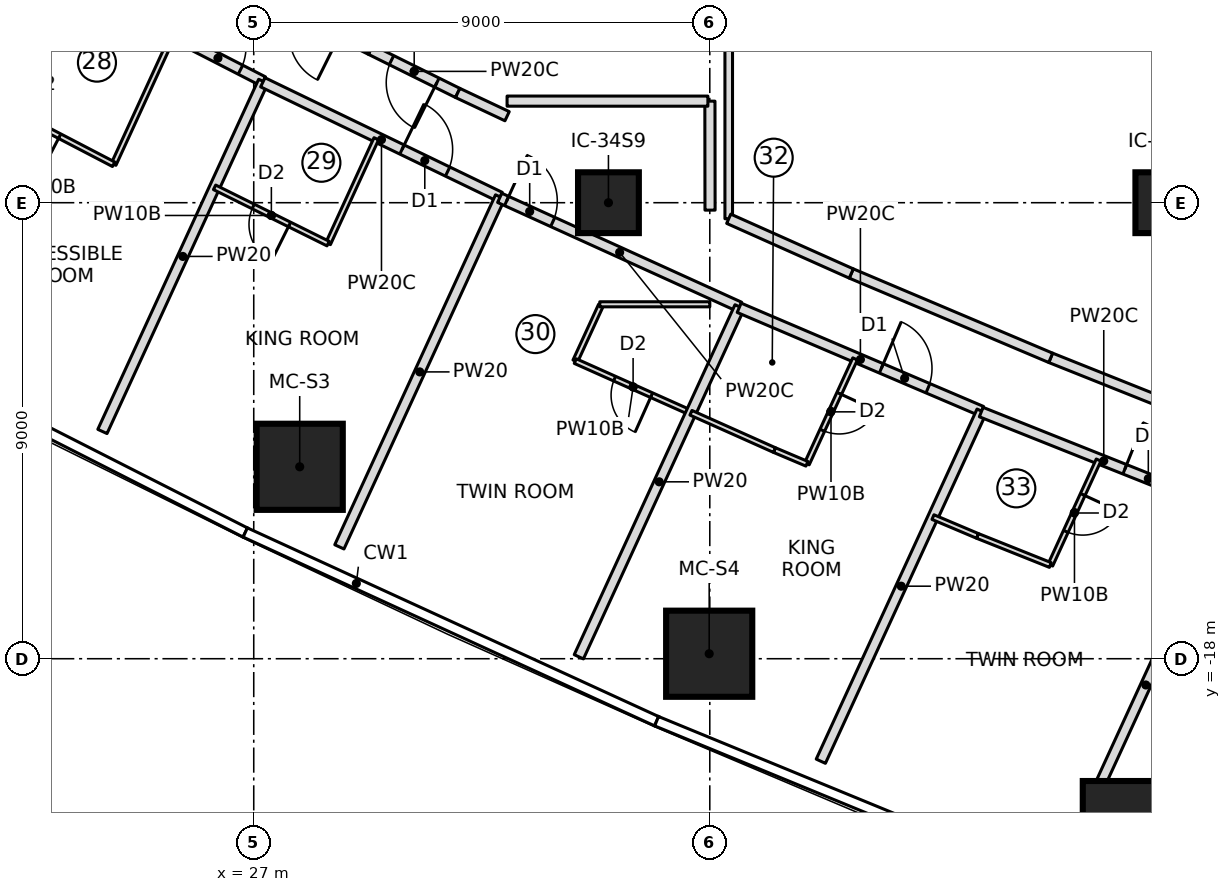
"""IFC4 building model, lengths in metres.
Left out: names, types, materials, properties, quantities, classifications, styles, units other than length and angle.
Written with IfcOpenShell. Run it as: python <this file> out.ifc"""

import sys

from ifc_helpers import new_model, si_unit, direction, frame, frame_2d, origin, origin_2d, place, context, subcontext, project, spatial, rectangle, extrude, element, fill, save


model = new_model("IFC4")
c1 = context("Model", 3, precision=1e-05, world=origin(), true_north=direction((0.0, 1.0)))
c2 = subcontext(c1, "Body", "Model", "MODEL_VIEW")
j1 = project(units=[si_unit("LENGTHUNIT", "METRE"), si_unit("PLANEANGLEUNIT", "RADIAN")], contexts=[c1])
p1 = place(None, origin())
s1 = spatial("IfcSite", under=j1, at=p1, CompositionType="ELEMENT")
p2 = place(p1, origin())
s2 = spatial("IfcBuilding", under=s1, at=p2, CompositionType="ELEMENT")
p3 = place(p2, frame((0.0, 0.0, 116.85)))
s3 = spatial("IfcBuildingStorey", under=s2, at=p3, CompositionType="ELEMENT", Elevation=116.85)
for number, where, z_axis, x_axis in (
    (1, (27.907, -14.212, 0.0), (0.0, 0.0, 1.0), (1.0, 0.0, 0.0)),
    (2, (35.988, -17.902, 0.0), (0.0, 0.0, 1.0), (1.0, 0.0, 0.0)),
    (3, (44.211, -21.264, 0.0), (0.0, 0.0, 1.0), (1.0, 0.0, 0.0)),
):
    element("IfcColumn", number, at=place(p3, frame(where, z_axis=z_axis, x_axis=x_axis)), inside=s3, PredefinedType="COLUMN", context=c2, shape_type="SweptSolid", body=[
        extrude(rectangle(XDim=1.7, YDim=1.7, at=origin_2d()), origin(), (0.0, 0.0, 1.0), 3.55),
    ])
for number, where, z_axis, x_axis in (
    (4, (34.0, -9.0, 0.0), (0.0, 0.0, 1.0), (1.0, 0.0, 0.0)),
    (5, (45.0, -9.0, 0.0), (0.0, 0.0, 1.0), (1.0, 0.0, 0.0)),
):
    element("IfcColumn", number, at=place(p3, frame(where, z_axis=z_axis, x_axis=x_axis)), inside=s3, PredefinedType="COLUMN", context=c2, shape_type="SweptSolid", body=[
        extrude(rectangle(XDim=1.2, YDim=1.2, at=origin_2d()), origin(), (0.0, 0.0, 1.0), 3.55),
    ])
p4 = place(p3, frame((22.557, -4.229, 0.0), z_axis=(0.0, 0.0, 1.0), x_axis=(0.889706581948, -0.456532800617, 0.0)))
e6 = element("IfcWall", 6, at=p4, inside=s3, PredefinedType="PARTITIONING", context=c2, shape_type="SweptSolid", body=[
    extrude(rectangle(XDim=5.205, YDim=0.2, at=frame_2d((2.603, 0.0))), origin(), (0.0, 0.0, 1.0), 3.15),
])
p5 = place(p4, frame((3.7, 0.0, 0.0)))
e7 = element("IfcOpeningElement", 7, at=p5, cuts=e6, PredefinedType="OPENING", context=c2, shape_type="SweptSolid", body=[
    extrude(rectangle(XDim=1.0, YDim=2.1, at=frame_2d((0.5, 1.05))), frame((0.0, 0.11, 0.0), z_axis=(0.0, -1.0, 0.0), x_axis=(1.0, 0.0, 0.0)), (0.0, 0.0, 1.0), 0.22),
])
p6 = place(p3, frame((25.396, -5.715, 0.0), z_axis=(0.0, 0.0, 1.0), x_axis=(-0.417359077977, -0.908741657475, 0.0)))
e8 = element("IfcWall", 8, at=p6, inside=s3, PredefinedType="PARTITIONING", context=c2, shape_type="SweptSolid", body=[
    extrude(rectangle(XDim=2.78, YDim=0.1, at=frame_2d((1.39, 0.0))), origin(), (0.0, 0.0, 1.0), 3.15),
])
p7 = place(p3, frame((24.235, -8.242, 0.0), z_axis=(0.0, 0.0, 1.0), x_axis=(-0.886897171809, 0.461966889114, 0.0)))
e9 = element("IfcWall", 9, at=p7, inside=s3, PredefinedType="PARTITIONING", context=c2, shape_type="SweptSolid", body=[
    extrude(rectangle(XDim=3.204, YDim=0.1, at=frame_2d((1.602, 0.0))), origin(), (0.0, 0.0, 1.0), 3.15),
])
p8 = place(p7, frame((1.2, 0.0, 0.0)))
e10 = element("IfcOpeningElement", 10, at=p8, cuts=e9, PredefinedType="OPENING", context=c2, shape_type="SweptSolid", body=[
    extrude(rectangle(XDim=0.8, YDim=2.1, at=frame_2d((0.4, 1.05))), frame((0.0, 0.06, 0.0), z_axis=(0.0, -1.0, 0.0), x_axis=(1.0, 0.0, 0.0)), (0.0, 0.0, 1.0), 0.12),
])
p9 = place(p3, frame((24.014, -13.515, 0.0), z_axis=(0.0, 0.0, 1.0), x_axis=(0.417428513692, 0.908709764422, 0.0)))
e11 = element("IfcWall", 11, at=p9, inside=s3, PredefinedType="PARTITIONING", context=c2, shape_type="SweptSolid", body=[
    extrude(rectangle(XDim=7.603, YDim=0.2, at=frame_2d((3.802, 0.0))), origin(), (0.0, 0.0, 1.0), 3.15),
])
p10 = place(p3, frame((27.179, -6.624, 0.0), z_axis=(0.0, 0.0, 1.0), x_axis=(0.900446408639, -0.434966970204, 0.0)))
e12 = element("IfcWall", 12, at=p10, inside=s3, PredefinedType="PARTITIONING", context=c2, shape_type="SweptSolid", body=[
    extrude(rectangle(XDim=5.201, YDim=0.2, at=frame_2d((2.601, 0.0))), origin(), (0.0, 0.0, 1.0), 3.15),
])
p11 = place(p10, frame((3.05, 0.0, 0.0)))
e13 = element("IfcOpeningElement", 13, at=p11, cuts=e12, PredefinedType="OPENING", context=c2, shape_type="SweptSolid", body=[
    extrude(rectangle(XDim=1.0, YDim=2.1, at=frame_2d((0.5, 1.05))), frame((0.0, 0.11, 0.0), z_axis=(0.0, -1.0, 0.0), x_axis=(1.0, 0.0, 0.0)), (0.0, 0.0, 1.0), 0.22),
])
p12 = place(p3, frame((29.419, -7.737, 0.0), z_axis=(0.0, 0.0, 1.0), x_axis=(-0.417344701557, -0.908748260016, 0.0)))
e14 = element("IfcWall", 14, at=p12, inside=s3, PredefinedType="PARTITIONING", context=c2, shape_type="SweptSolid", body=[
    extrude(rectangle(XDim=2.278, YDim=0.1, at=frame_2d((1.139, 0.0))), origin(), (0.0, 0.0, 1.0), 3.15),
])
p13 = place(p3, frame((28.468, -9.807, 0.0), z_axis=(0.0, 0.0, 1.0), x_axis=(-0.895944857815, 0.444165297784, 0.0)))
e15 = element("IfcWall", 15, at=p13, inside=s3, PredefinedType="PARTITIONING", context=c2, shape_type="SweptSolid", body=[
    extrude(rectangle(XDim=2.501, YDim=0.1, at=frame_2d((1.25, 0.0))), origin(), (0.0, 0.0, 1.0), 3.15),
])
p14 = place(p13, frame((0.85, 0.0, 0.0)))
e16 = element("IfcOpeningElement", 16, at=p14, cuts=e15, PredefinedType="OPENING", context=c2, shape_type="SweptSolid", body=[
    extrude(rectangle(XDim=0.8, YDim=2.1, at=frame_2d((0.4, 1.05))), frame((0.0, 0.06, 0.0), z_axis=(0.0, -1.0, 0.0), x_axis=(1.0, 0.0, 0.0)), (0.0, 0.0, 1.0), 0.12),
])
p15 = place(p3, frame((28.69, -15.792, 0.0), z_axis=(0.0, 0.0, 1.0), x_axis=(0.417429919618, 0.90870911859, 0.0)))
e17 = element("IfcWall", 17, at=p15, inside=s3, PredefinedType="PARTITIONING", context=c2, shape_type="SweptSolid", body=[
    extrude(rectangle(XDim=7.6, YDim=0.2, at=frame_2d((3.8, 0.0))), origin(), (0.0, 0.0, 1.0), 3.15),
])
p16 = place(p3, frame((31.854, -8.904, 0.0), z_axis=(0.0, 0.0, 1.0), x_axis=(0.910421138148, -0.413682669704, 0.0)))
e18 = element("IfcWall", 18, at=p16, inside=s3, PredefinedType="PARTITIONING", context=c2, shape_type="SweptSolid", body=[
    extrude(rectangle(XDim=5.2, YDim=0.2, at=frame_2d((2.6, 0.0))), origin(), (0.0, 0.0, 1.0), 3.15),
])
p17 = place(p16, frame((0.15, 0.0, 0.0)))
e19 = element("IfcOpeningElement", 19, at=p17, cuts=e18, PredefinedType="OPENING", context=c2, shape_type="SweptSolid", body=[
    extrude(rectangle(XDim=1.0, YDim=2.1, at=frame_2d((0.5, 1.05))), frame((0.0, 0.11, 0.0), z_axis=(0.0, -1.0, 0.0), x_axis=(1.0, 0.0, 0.0)), (0.0, 0.0, 1.0), 0.22),
])
p18 = place(p3, frame((33.345, -12.126, 0.0), z_axis=(0.0, 0.0, 1.0), x_axis=(0.417500171551, 0.908676843963, 0.0)))
e20 = element("IfcWall", 20, at=p18, inside=s3, PredefinedType="PARTITIONING", context=c2, shape_type="SweptSolid", body=[
    extrude(rectangle(XDim=1.213, YDim=0.1, at=frame_2d((0.606, 0.0))), origin(), (0.0, 0.0, 1.0), 3.15),
])
p19 = place(p3, frame((35.628, -13.146, 0.0), z_axis=(0.0, 0.0, 1.0), x_axis=(-0.913052819539, 0.407841327885, 0.0)))
e21 = element("IfcWall", 21, at=p19, inside=s3, PredefinedType="PARTITIONING", context=c2, shape_type="SweptSolid", body=[
    extrude(rectangle(XDim=2.5, YDim=0.1, at=frame_2d((1.25, 0.0))), origin(), (0.0, 0.0, 1.0), 3.15),
])
p20 = place(p19, frame((0.85, 0.0, 0.0)))
e22 = element("IfcOpeningElement", 22, at=p20, cuts=e21, PredefinedType="OPENING", context=c2, shape_type="SweptSolid", body=[
    extrude(rectangle(XDim=0.8, YDim=2.1, at=frame_2d((0.4, 1.05))), frame((0.0, 0.06, 0.0), z_axis=(0.0, -1.0, 0.0), x_axis=(1.0, 0.0, 0.0)), (0.0, 0.0, 1.0), 0.12),
])
p21 = place(p3, frame((33.416, -17.962, 0.0), z_axis=(0.0, 0.0, 1.0), x_axis=(0.417429919618, 0.90870911859, 0.0)))
e23 = element("IfcWall", 23, at=p21, inside=s3, PredefinedType="PARTITIONING", context=c2, shape_type="SweptSolid", body=[
    extrude(rectangle(XDim=7.6, YDim=0.2, at=frame_2d((3.8, 0.0))), origin(), (0.0, 0.0, 1.0), 3.15),
])
p22 = place(p3, frame((36.58, -11.073, 0.0), z_axis=(0.0, 0.0, 1.0), x_axis=(0.919874136955, -0.392213681762, 0.0)))
e24 = element("IfcWall", 24, at=p22, inside=s3, PredefinedType="PARTITIONING", context=c2, shape_type="SweptSolid", body=[
    extrude(rectangle(XDim=5.202, YDim=0.2, at=frame_2d((2.601, 0.0))), origin(), (0.0, 0.0, 1.0), 3.15),
])
p23 = place(p22, frame((3.05, 0.0, 0.0)))
e25 = element("IfcOpeningElement", 25, at=p23, cuts=e24, PredefinedType="OPENING", context=c2, shape_type="SweptSolid", body=[
    extrude(rectangle(XDim=1.0, YDim=2.1, at=frame_2d((0.5, 1.05))), frame((0.0, 0.11, 0.0), z_axis=(0.0, -1.0, 0.0), x_axis=(1.0, 0.0, 0.0)), (0.0, 0.0, 1.0), 0.22),
])
p24 = place(p3, frame((38.867, -12.083, 0.0), z_axis=(0.0, 0.0, 1.0), x_axis=(-0.417433204355, -0.908707609686, 0.0)))
e26 = element("IfcWall", 26, at=p24, inside=s3, PredefinedType="PARTITIONING", context=c2, shape_type="SweptSolid", body=[
    extrude(rectangle(XDim=2.278, YDim=0.1, at=frame_2d((1.139, 0.0))), origin(), (0.0, 0.0, 1.0), 3.15),
])
p25 = place(p24, frame((0.75, 0.0, 0.0)))
e27 = element("IfcOpeningElement", 27, at=p25, cuts=e26, PredefinedType="OPENING", context=c2, shape_type="SweptSolid", body=[
    extrude(rectangle(XDim=0.8, YDim=2.1, at=frame_2d((0.4, 1.05))), frame((0.0, 0.06, 0.0), z_axis=(0.0, -1.0, 0.0), x_axis=(1.0, 0.0, 0.0)), (0.0, 0.0, 1.0), 0.12),
])
p26 = place(p3, frame((37.917, -14.153, 0.0), z_axis=(0.0, 0.0, 1.0), x_axis=(-0.920972104389, 0.389628519153, 0.0)))
e28 = element("IfcWall", 28, at=p26, inside=s3, PredefinedType="PARTITIONING", context=c2, shape_type="SweptSolid", body=[
    extrude(rectangle(XDim=0.694, YDim=0.1, at=frame_2d((0.347, 0.0))), origin(), (0.0, 0.0, 1.0), 3.15),
])
p27 = place(p3, frame((37.277, -13.882, 0.0), z_axis=(0.0, 0.0, 1.0), x_axis=(-0.913023709843, 0.407906490833, 0.0)))
e29 = element("IfcWall", 29, at=p27, inside=s3, PredefinedType="PARTITIONING", context=c2, shape_type="SweptSolid", body=[
    extrude(rectangle(XDim=1.806, YDim=0.1, at=frame_2d((0.903, 0.0))), origin(), (0.0, 0.0, 1.0), 3.15),
])
p28 = place(p3, frame((38.191, -20.023, 0.0), z_axis=(0.0, 0.0, 1.0), x_axis=(0.417416334044, 0.908715359215, 0.0)))
e30 = element("IfcWall", 30, at=p28, inside=s3, PredefinedType="PARTITIONING", context=c2, shape_type="SweptSolid", body=[
    extrude(rectangle(XDim=7.604, YDim=0.2, at=frame_2d((3.802, 0.0))), origin(), (0.0, 0.0, 1.0), 3.15),
])
p29 = place(p3, frame((41.357, -13.132, 0.0), z_axis=(0.0, 0.0, 1.0), x_axis=(0.928902922329, -0.370323319396, 0.0)))
e31 = element("IfcWall", 31, at=p29, inside=s3, PredefinedType="PARTITIONING", context=c2, shape_type="SweptSolid", body=[
    extrude(rectangle(XDim=5.207, YDim=0.2, at=frame_2d((2.604, 0.0))), origin(), (0.0, 0.0, 1.0), 3.15),
])
p30 = place(p29, frame((3.05, 0.0, 0.0)))
e32 = element("IfcOpeningElement", 32, at=p30, cuts=e31, PredefinedType="OPENING", context=c2, shape_type="SweptSolid", body=[
    extrude(rectangle(XDim=1.0, YDim=2.1, at=frame_2d((0.5, 1.05))), frame((0.0, 0.11, 0.0), z_axis=(0.0, -1.0, 0.0), x_axis=(1.0, 0.0, 0.0)), (0.0, 0.0, 1.0), 0.22),
])
p31 = place(p3, frame((43.673, -14.079, 0.0), z_axis=(0.0, 0.0, 1.0), x_axis=(-0.417414140651, -0.908716366742, 0.0)))
e33 = element("IfcWall", 33, at=p31, inside=s3, PredefinedType="PARTITIONING", context=c2, shape_type="SweptSolid", body=[
    extrude(rectangle(XDim=2.28, YDim=0.1, at=frame_2d((1.14, 0.0))), origin(), (0.0, 0.0, 1.0), 3.15),
])
p32 = place(p31, frame((0.75, 0.0, 0.0)))
e34 = element("IfcOpeningElement", 34, at=p32, cuts=e33, PredefinedType="OPENING", context=c2, shape_type="SweptSolid", body=[
    extrude(rectangle(XDim=0.8, YDim=2.1, at=frame_2d((0.4, 1.05))), frame((0.0, 0.06, 0.0), z_axis=(0.0, -1.0, 0.0), x_axis=(1.0, 0.0, 0.0)), (0.0, 0.0, 1.0), 0.12),
])
p33 = place(p3, frame((42.721, -16.151, 0.0), z_axis=(0.0, 0.0, 1.0), x_axis=(-0.928607087251, 0.371064519333, 0.0)))
e35 = element("IfcWall", 35, at=p33, inside=s3, PredefinedType="PARTITIONING", context=c2, shape_type="SweptSolid", body=[
    extrude(rectangle(XDim=1.549, YDim=0.1, at=frame_2d((0.774, 0.0))), origin(), (0.0, 0.0, 1.0), 3.15),
])
p34 = place(p3, frame((41.283, -15.576, 0.0), z_axis=(0.0, 0.0, 1.0), x_axis=(-0.921041449483, 0.389464566212, 0.0)))
e36 = element("IfcWall", 36, at=p34, inside=s3, PredefinedType="PARTITIONING", context=c2, shape_type="SweptSolid", body=[
    extrude(rectangle(XDim=0.953, YDim=0.1, at=frame_2d((0.477, 0.0))), origin(), (0.0, 0.0, 1.0), 3.15),
])
p35 = place(p3, frame((43.016, -21.976, 0.0), z_axis=(0.0, 0.0, 1.0), x_axis=(0.417444332366, 0.908702497727, 0.0)))
e37 = element("IfcWall", 37, at=p35, inside=s3, PredefinedType="PARTITIONING", context=c2, shape_type="SweptSolid", body=[
    extrude(rectangle(XDim=7.611, YDim=0.2, at=frame_2d((3.805, 0.0))), origin(), (0.0, 0.0, 1.0), 3.15),
])
p36 = place(p3, frame((29.308, -5.983, 0.0), z_axis=(0.0, 0.0, 1.0), x_axis=(-0.895954899574, 0.444145041546, 0.0)))
e38 = element("IfcWall", 38, at=p36, inside=s3, PredefinedType="PARTITIONING", context=c2, shape_type="SweptSolid", body=[
    extrude(rectangle(XDim=2.357, YDim=0.2, at=frame_2d((1.179, 0.0))), origin(), (0.0, 0.0, 1.0), 3.15),
])
p37 = place(p36, frame((0.678, 0.0, 0.0)))
e39 = element("IfcOpeningElement", 39, at=p37, cuts=e38, PredefinedType="OPENING", context=c2, shape_type="SweptSolid", body=[
    extrude(rectangle(XDim=1.0, YDim=2.1, at=frame_2d((0.5, 1.05))), frame((0.0, 0.11, 0.0), z_axis=(0.0, -1.0, 0.0), x_axis=(1.0, 0.0, 0.0)), (0.0, 0.0, 1.0), 0.22),
])
p38 = place(p3, frame((31.025, -6.833, 0.0), z_axis=(0.0, 0.0, 1.0), x_axis=(-0.896001589052, 0.444050844404, 0.0)))
e40 = element("IfcWall", 40, at=p38, inside=s3, PredefinedType="PARTITIONING", context=c2, shape_type="SweptSolid", body=[
    extrude(rectangle(XDim=1.916, YDim=0.2, at=frame_2d((0.958, 0.0))), origin(), (0.0, 0.0, 1.0), 3.15),
])
p39 = place(p38, frame((0.458, 0.0, 0.0)))
e41 = element("IfcOpeningElement", 41, at=p39, cuts=e40, PredefinedType="OPENING", context=c2, shape_type="SweptSolid", body=[
    extrude(rectangle(XDim=1.0, YDim=2.1, at=frame_2d((0.5, 1.05))), frame((0.0, 0.11, 0.0), z_axis=(0.0, -1.0, 0.0), x_axis=(1.0, 0.0, 0.0)), (0.0, 0.0, 1.0), 0.22),
])
p40 = place(p3, frame((32.0, -7.293, 0.0), z_axis=(0.0, 0.0, 1.0), x_axis=(-0.904690325494, 0.426069730159, 0.0)))
e42 = element("IfcWall", 42, at=p40, inside=s3, PredefinedType="PARTITIONING", context=c2, shape_type="SweptSolid", body=[
    extrude(rectangle(XDim=1.078, YDim=0.2, at=frame_2d((0.539, 0.0))), origin(), (0.0, 0.0, 1.0), 3.15),
])
p41 = place(p3, frame((36.374, -9.317, 0.0), z_axis=(0.0, 0.0, 1.0), x_axis=(0.0, 1.0, 0.0)))
e43 = element("IfcWall", 43, at=p41, inside=s3, PredefinedType="PARTITIONING", context=c2, shape_type="SweptSolid", body=[
    extrude(rectangle(XDim=18.634, YDim=0.15, at=frame_2d((9.317, 0.0))), origin(), (0.0, 0.0, 1.0), 3.15),
])
p42 = place(p3, frame((46.696, -13.647, 0.0), z_axis=(0.0, 0.0, 1.0), x_axis=(-0.928638161177, 0.370986745864, 0.0)))
e44 = element("IfcWall", 44, at=p42, inside=s3, PredefinedType="PARTITIONING", context=c2, shape_type="SweptSolid", body=[
    extrude(rectangle(XDim=4.273, YDim=0.2, at=frame_2d((2.136, 0.0))), origin(), (0.0, 0.0, 1.0), 3.15),
])
p43 = place(p3, frame((42.728, -12.062, 0.0), z_axis=(0.0, 0.0, 1.0), x_axis=(-0.921037415532, 0.389474105929, 0.0)))
e45 = element("IfcWall", 45, at=p43, inside=s3, PredefinedType="PARTITIONING", context=c2, shape_type="SweptSolid", body=[
    extrude(rectangle(XDim=4.273, YDim=0.2, at=frame_2d((2.137, 0.0))), origin(), (0.0, 0.0, 1.0), 3.15),
])
p44 = place(p3, frame((38.792, -10.397, 0.0), z_axis=(0.0, 0.0, 1.0), x_axis=(-0.913030623494, 0.407891015544, 0.0)))
e46 = element("IfcWall", 46, at=p44, inside=s3, PredefinedType="PARTITIONING", context=c2, shape_type="SweptSolid", body=[
    extrude(rectangle(XDim=2.648, YDim=0.2, at=frame_2d((1.324, 0.0))), origin(), (0.0, 0.0, 1.0), 3.15),
])
p45 = place(p3, frame((33.829, -11.005, 0.0), z_axis=(0.0, 0.0, 1.0), x_axis=(1.0, 0.0, 0.0)))
e47 = element("IfcWall", 47, at=p45, inside=s3, PredefinedType="PARTITIONING", context=c2, shape_type="SweptSolid", body=[
    extrude(rectangle(XDim=2.172, YDim=0.1, at=frame_2d((1.086, 0.0))), origin(), (0.0, 0.0, 1.0), 3.15),
])
p46 = place(p3, frame((36.005, -9.146, 0.0), z_axis=(0.0, 0.0, 1.0), x_axis=(-0.001135073049, 0.999999355804, 0.0)))
e48 = element("IfcWall", 48, at=p46, inside=s3, PredefinedType="PARTITIONING", context=c2, shape_type="SweptSolid", body=[
    extrude(rectangle(XDim=2.151, YDim=0.2, at=frame_2d((1.075, 0.0))), origin(), (0.0, 0.0, 1.0), 3.15),
])
p47 = place(p3, frame((35.962, -6.996, 0.0), z_axis=(0.0, 0.0, 1.0), x_axis=(-0.999999992409, 0.000123213405, 0.0)))
e49 = element("IfcWall", 49, at=p47, inside=s3, PredefinedType="PARTITIONING", context=c2, shape_type="SweptSolid", body=[
    extrude(rectangle(XDim=3.963, YDim=0.2, at=frame_2d((1.981, 0.0))), origin(), (0.0, 0.0, 1.0), 3.15),
])
p48 = place(p8, origin())
e50 = element("IfcDoor", 50, at=p48, inside=s3, OperationType="SINGLE_SWING_LEFT", PredefinedType="DOOR", context=c2, shape_type="SweptSolid", body=[
    extrude(rectangle(XDim=0.8, YDim=2.1, at=frame_2d((0.4, 1.05))), frame((0.0, 0.025, 0.0), z_axis=(0.0, -1.0, 0.0), x_axis=(1.0, 0.0, 0.0)), (0.0, 0.0, 1.0), 0.05),
])
fill(e10, e50)
p49 = place(p5, origin())
e51 = element("IfcDoor", 51, at=p49, inside=s3, OperationType="SINGLE_SWING_LEFT", PredefinedType="DOOR", context=c2, shape_type="SweptSolid", body=[
    extrude(rectangle(XDim=1.0, YDim=2.1, at=frame_2d((0.5, 1.05))), frame((0.0, 0.025, 0.0), z_axis=(0.0, -1.0, 0.0), x_axis=(1.0, 0.0, 0.0)), (0.0, 0.0, 1.0), 0.05),
])
fill(e7, e51)
p50 = place(p14, origin())
e52 = element("IfcDoor", 52, at=p50, inside=s3, OperationType="SINGLE_SWING_LEFT", PredefinedType="DOOR", context=c2, shape_type="SweptSolid", body=[
    extrude(rectangle(XDim=0.8, YDim=2.1, at=frame_2d((0.4, 1.05))), frame((0.0, 0.025, 0.0), z_axis=(0.0, -1.0, 0.0), x_axis=(1.0, 0.0, 0.0)), (0.0, 0.0, 1.0), 0.05),
])
fill(e16, e52)
p51 = place(p11, origin())
e53 = element("IfcDoor", 53, at=p51, inside=s3, OperationType="SINGLE_SWING_LEFT", PredefinedType="DOOR", context=c2, shape_type="SweptSolid", body=[
    extrude(rectangle(XDim=1.0, YDim=2.1, at=frame_2d((0.5, 1.05))), frame((0.0, 0.025, 0.0), z_axis=(0.0, -1.0, 0.0), x_axis=(1.0, 0.0, 0.0)), (0.0, 0.0, 1.0), 0.05),
])
fill(e13, e53)
p52 = place(p20, origin())
e54 = element("IfcDoor", 54, at=p52, inside=s3, OperationType="SINGLE_SWING_LEFT", PredefinedType="DOOR", context=c2, shape_type="SweptSolid", body=[
    extrude(rectangle(XDim=0.8, YDim=2.1, at=frame_2d((0.4, 1.05))), frame((0.0, 0.025, 0.0), z_axis=(0.0, -1.0, 0.0), x_axis=(1.0, 0.0, 0.0)), (0.0, 0.0, 1.0), 0.05),
])
fill(e22, e54)
p53 = place(p17, origin())
e55 = element("IfcDoor", 55, at=p53, inside=s3, OperationType="SINGLE_SWING_LEFT", PredefinedType="DOOR", context=c2, shape_type="SweptSolid", body=[
    extrude(rectangle(XDim=1.0, YDim=2.1, at=frame_2d((0.5, 1.05))), frame((0.0, 0.025, 0.0), z_axis=(0.0, -1.0, 0.0), x_axis=(1.0, 0.0, 0.0)), (0.0, 0.0, 1.0), 0.05),
])
fill(e19, e55)
p54 = place(p25, origin())
e56 = element("IfcDoor", 56, at=p54, inside=s3, OperationType="SINGLE_SWING_LEFT", PredefinedType="DOOR", context=c2, shape_type="SweptSolid", body=[
    extrude(rectangle(XDim=0.8, YDim=2.1, at=frame_2d((0.4, 1.05))), frame((0.0, 0.025, 0.0), z_axis=(0.0, -1.0, 0.0), x_axis=(1.0, 0.0, 0.0)), (0.0, 0.0, 1.0), 0.05),
])
fill(e27, e56)
p55 = place(p23, origin())
e57 = element("IfcDoor", 57, at=p55, inside=s3, OperationType="SINGLE_SWING_LEFT", PredefinedType="DOOR", context=c2, shape_type="SweptSolid", body=[
    extrude(rectangle(XDim=1.0, YDim=2.1, at=frame_2d((0.5, 1.05))), frame((0.0, 0.025, 0.0), z_axis=(0.0, -1.0, 0.0), x_axis=(1.0, 0.0, 0.0)), (0.0, 0.0, 1.0), 0.05),
])
fill(e25, e57)
p56 = place(p32, origin())
e58 = element("IfcDoor", 58, at=p56, inside=s3, OperationType="SINGLE_SWING_LEFT", PredefinedType="DOOR", context=c2, shape_type="SweptSolid", body=[
    extrude(rectangle(XDim=0.8, YDim=2.1, at=frame_2d((0.4, 1.05))), frame((0.0, 0.025, 0.0), z_axis=(0.0, -1.0, 0.0), x_axis=(1.0, 0.0, 0.0)), (0.0, 0.0, 1.0), 0.05),
])
fill(e34, e58)
p57 = place(p30, origin())
e59 = element("IfcDoor", 59, at=p57, inside=s3, OperationType="SINGLE_SWING_LEFT", PredefinedType="DOOR", context=c2, shape_type="SweptSolid", body=[
    extrude(rectangle(XDim=1.0, YDim=2.1, at=frame_2d((0.5, 1.05))), frame((0.0, 0.025, 0.0), z_axis=(0.0, -1.0, 0.0), x_axis=(1.0, 0.0, 0.0)), (0.0, 0.0, 1.0), 0.05),
])
fill(e32, e59)
p58 = place(p39, origin())
e60 = element("IfcDoor", 60, at=p58, inside=s3, OperationType="SINGLE_SWING_RIGHT", PredefinedType="DOOR", context=c2, shape_type="SweptSolid", body=[
    extrude(rectangle(XDim=1.0, YDim=2.1, at=frame_2d((0.5, 1.05))), frame((0.0, 0.025, 0.0), z_axis=(0.0, -1.0, 0.0), x_axis=(1.0, 0.0, 0.0)), (0.0, 0.0, 1.0), 0.05),
])
fill(e41, e60)
save(model, sys.argv[1])
